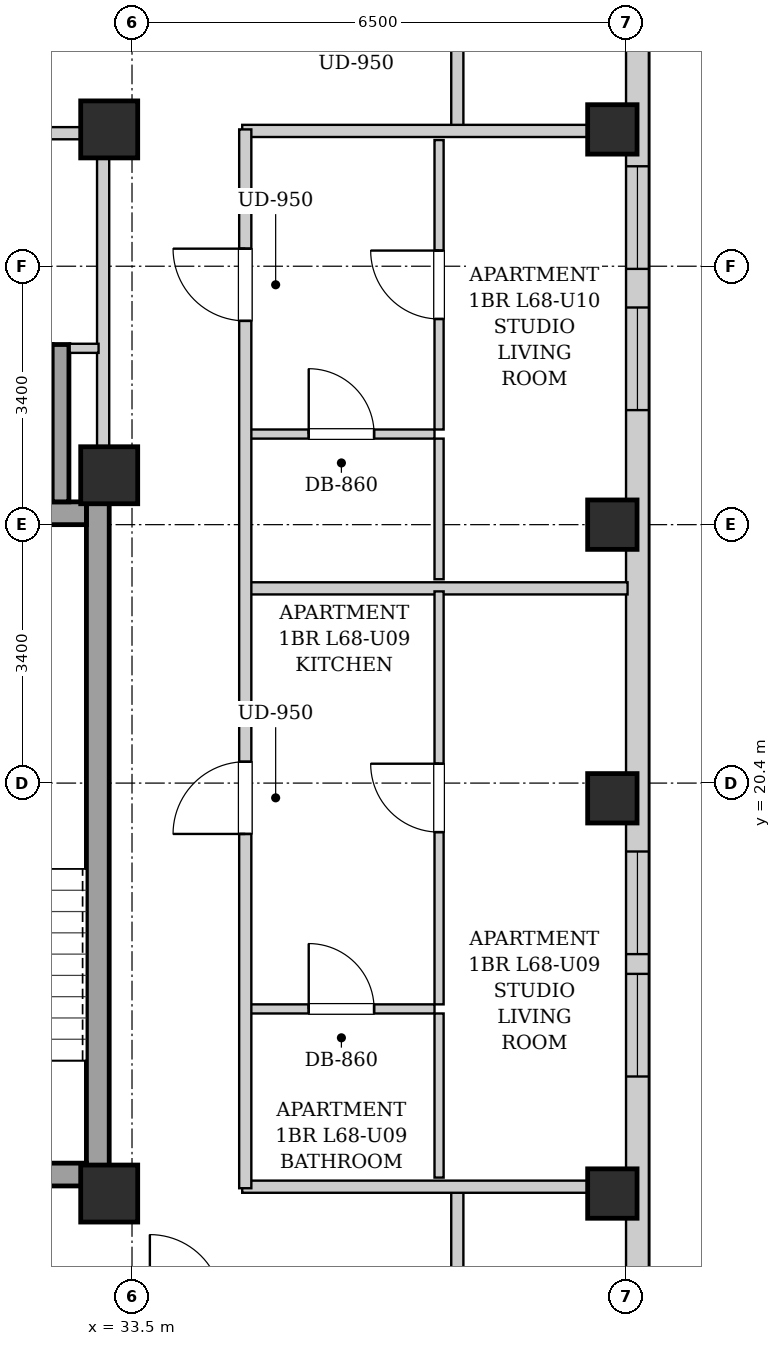
"""IFC4 building model, lengths in metres.
Left out: names, types, materials, properties, quantities, classifications, styles, units other than length and angle.
Written with IfcOpenShell. Run it as: python <this file> out.ifc"""

import sys

from ifc_helpers import new_model, si_unit, direction, frame, frame_2d, origin, origin_2d, place, context, subcontext, project, spatial, rectangle, extrude, element, fill, save


model = new_model("IFC4")
c1 = context("Model", 3, precision=1e-05, world=origin(), true_north=direction((0.0, 1.0)))
c2 = subcontext(c1, "Body", "Model", "MODEL_VIEW")
j1 = project(units=[si_unit("LENGTHUNIT", "METRE"), si_unit("PLANEANGLEUNIT", "RADIAN")], contexts=[c1])
p1 = place(None, origin())
s1 = spatial("IfcSite", under=j1, at=p1, CompositionType="ELEMENT")
p2 = place(p1, origin())
s2 = spatial("IfcBuilding", under=s1, at=p2, CompositionType="ELEMENT")
p3 = place(p2, frame((0.0, 0.0, 234.3)))
s3 = spatial("IfcBuildingStorey", under=s2, at=p3, CompositionType="ELEMENT", Elevation=234.3)
for number, where, z_axis, x_axis in (
    (1, (39.82, 15.0, 0.0), (0.0, 0.0, 1.0), (1.0, 0.0, 0.0)),
    (2, (39.82, 20.2, 0.0), (0.0, 0.0, 1.0), (1.0, 0.0, 0.0)),
    (3, (39.82, 23.8, 0.0), (0.0, 0.0, 1.0), (1.0, 0.0, 0.0)),
    (4, (39.82, 29.0, 0.0), (0.0, 0.0, 1.0), (1.0, 0.0, 0.0)),
):
    element("IfcColumn", number, at=place(p3, frame(where, z_axis=z_axis, x_axis=x_axis)), inside=s3, PredefinedType="COLUMN", context=c2, shape_type="SweptSolid", body=[
        extrude(rectangle(XDim=0.65, YDim=0.65, at=origin_2d()), origin(), (0.0, 0.0, 1.0), 3.4),
    ])
for number, where, z_axis, x_axis in (
    (5, (33.2, 15.0, 0.0), (0.0, 0.0, 1.0), (1.0, 0.0, 0.0)),
    (6, (33.2, 29.0, 0.0), (0.0, 0.0, 1.0), (1.0, 0.0, 0.0)),
    (7, (33.2, 24.45, 0.0), (0.0, 0.0, 1.0), (1.0, 0.0, 0.0)),
):
    element("IfcColumn", number, at=place(p3, frame(where, z_axis=z_axis, x_axis=x_axis)), inside=s3, PredefinedType="COLUMN", context=c2, shape_type="SweptSolid", body=[
        extrude(rectangle(XDim=0.75, YDim=0.75, at=origin_2d()), origin(), (0.0, 0.0, 1.0), 3.4),
    ])
p4 = place(p3, frame((40.15, 37.7, 0.0), z_axis=(0.0, 0.0, 1.0), x_axis=(0.0, -1.0, 0.0)))
e8 = element("IfcWall", 8, at=p4, inside=s3, PredefinedType="SOLIDWALL", context=c2, shape_type="SweptSolid", body=[
    extrude(rectangle(XDim=31.4, YDim=0.3, at=frame_2d((15.7, 0.0))), origin(), (0.0, 0.0, 1.0), 3.14),
])
p5 = place(p4, frame((28.546, 0.0, 0.55)))
e9 = element("IfcOpeningElement", 9, at=p5, cuts=e8, PredefinedType="OPENING", context=c2, shape_type="SweptSolid", body=[
    extrude(rectangle(XDim=1.35, YDim=1.2, at=frame_2d((0.675, 0.6))), frame((0.0, 0.16, 0.0), z_axis=(0.0, -1.0, 0.0), x_axis=(1.0, 0.0, 0.0)), (0.0, 0.0, 1.0), 0.32),
])
p6 = place(p4, frame((1.504, 0.0, 0.55)))
e10 = element("IfcOpeningElement", 10, at=p6, cuts=e8, PredefinedType="OPENING", context=c2, shape_type="SweptSolid", body=[
    extrude(rectangle(XDim=1.35, YDim=1.2, at=frame_2d((0.675, 0.6))), frame((0.0, 0.16, 0.0), z_axis=(0.0, -1.0, 0.0), x_axis=(1.0, 0.0, 0.0)), (0.0, 0.0, 1.0), 0.32),
])
p7 = place(p4, frame((18.2, 0.0, 0.55)))
e11 = element("IfcOpeningElement", 11, at=p7, cuts=e8, PredefinedType="OPENING", context=c2, shape_type="SweptSolid", body=[
    extrude(rectangle(XDim=1.35, YDim=1.2, at=frame_2d((0.675, 0.6))), frame((0.0, 0.16, 0.0), z_axis=(0.0, -1.0, 0.0), x_axis=(1.0, 0.0, 0.0)), (0.0, 0.0, 1.0), 0.32),
])
p8 = place(p4, frame((19.81, 0.0, 0.55)))
e12 = element("IfcOpeningElement", 12, at=p8, cuts=e8, PredefinedType="OPENING", context=c2, shape_type="SweptSolid", body=[
    extrude(rectangle(XDim=1.35, YDim=1.2, at=frame_2d((0.675, 0.6))), frame((0.0, 0.16, 0.0), z_axis=(0.0, -1.0, 0.0), x_axis=(1.0, 0.0, 0.0)), (0.0, 0.0, 1.0), 0.32),
])
p9 = place(p4, frame((11.043, 0.0, 0.55)))
e13 = element("IfcOpeningElement", 13, at=p9, cuts=e8, PredefinedType="OPENING", context=c2, shape_type="SweptSolid", body=[
    extrude(rectangle(XDim=1.35, YDim=1.2, at=frame_2d((0.675, 0.6))), frame((0.0, 0.16, 0.0), z_axis=(0.0, -1.0, 0.0), x_axis=(1.0, 0.0, 0.0)), (0.0, 0.0, 1.0), 0.32),
])
p10 = place(p4, frame((9.185, 0.0, 0.55)))
e14 = element("IfcOpeningElement", 14, at=p10, cuts=e8, PredefinedType="OPENING", context=c2, shape_type="SweptSolid", body=[
    extrude(rectangle(XDim=1.35, YDim=1.2, at=frame_2d((0.675, 0.6))), frame((0.0, 0.16, 0.0), z_axis=(0.0, -1.0, 0.0), x_axis=(1.0, 0.0, 0.0)), (0.0, 0.0, 1.0), 0.32),
])
p11 = place(p3, frame((33.05, 15.1, 0.0), z_axis=(0.0, 0.0, 1.0), x_axis=(0.0, 1.0, 0.0)))
e15 = element("IfcWall", 15, at=p11, inside=s3, PredefinedType="SHEAR", context=c2, shape_type="SweptSolid", body=[
    extrude(rectangle(XDim=9.0, YDim=0.3, at=frame_2d((4.5, 0.0))), origin(), (0.0, 0.0, 1.0), 3.14),
])
p12 = place(p3, frame((30.05, 23.95, 0.0), z_axis=(0.0, 0.0, 1.0), x_axis=(1.0, 0.0, 0.0)))
e16 = element("IfcWall", 16, at=p12, inside=s3, PredefinedType="SHEAR", context=c2, shape_type="SweptSolid", body=[
    extrude(rectangle(XDim=2.85, YDim=0.3, at=frame_2d((1.425, 0.0))), origin(), (0.0, 0.0, 1.0), 3.14),
])
p13 = place(p3, frame((30.05, 15.25, 0.0), z_axis=(0.0, 0.0, 1.0), x_axis=(1.0, 0.0, 0.0)))
e17 = element("IfcWall", 17, at=p13, inside=s3, PredefinedType="SHEAR", context=c2, shape_type="SweptSolid", body=[
    extrude(rectangle(XDim=2.85, YDim=0.3, at=frame_2d((1.425, 0.0))), origin(), (0.0, 0.0, 1.0), 3.14),
])
p14 = place(p13, frame((0.86, 0.0, 0.0)))
e18 = element("IfcOpeningElement", 18, at=p14, cuts=e17, PredefinedType="OPENING", context=c2, shape_type="SweptSolid", body=[
    extrude(rectangle(XDim=1.1, YDim=2.05, at=frame_2d((0.55, 1.025))), frame((0.0, 0.16, 0.0), z_axis=(0.0, -1.0, 0.0), x_axis=(1.0, 0.0, 0.0)), (0.0, 0.0, 1.0), 0.32),
])
p15 = place(p3, frame((32.56, 24.1, 0.0), z_axis=(0.0, 0.0, 1.0), x_axis=(0.0, 1.0, 0.0)))
e19 = element("IfcWall", 19, at=p15, inside=s3, PredefinedType="SHEAR", context=c2, shape_type="SweptSolid", body=[
    extrude(rectangle(XDim=2.07, YDim=0.22, at=frame_2d((1.035, 0.0))), origin(), (0.0, 0.0, 1.0), 3.14),
])
p16 = place(p3, frame((33.12, 24.12, 0.0), z_axis=(0.0, 0.0, 1.0), x_axis=(0.0, 1.0, 0.0)))
e20 = element("IfcWall", 20, at=p16, inside=s3, PredefinedType="PARTITIONING", context=c2, shape_type="SweptSolid", body=[
    extrude(rectangle(XDim=4.76, YDim=0.16, at=frame_2d((2.38, 0.0))), origin(), (0.0, 0.0, 1.0), 3.14),
])
p17 = place(p3, frame((32.68, 26.12, 0.0), z_axis=(0.0, 0.0, 1.0), x_axis=(1.0, 0.0, 0.0)))
e21 = element("IfcWall", 21, at=p17, inside=s3, PredefinedType="PARTITIONING", context=c2, shape_type="SweptSolid", body=[
    extrude(rectangle(XDim=0.38, YDim=0.12, at=frame_2d((0.19, 0.0))), origin(), (0.0, 0.0, 1.0), 3.14),
])
p18 = place(p3, frame((30.08, 28.95, 0.0), z_axis=(0.0, 0.0, 1.0), x_axis=(1.0, 0.0, 0.0)))
e22 = element("IfcWall", 22, at=p18, inside=s3, PredefinedType="PARTITIONING", context=c2, shape_type="SweptSolid", body=[
    extrude(rectangle(XDim=2.96, YDim=0.16, at=frame_2d((1.48, 0.0))), origin(), (0.0, 0.0, 1.0), 3.14),
])
p19 = place(p18, frame((0.695, 0.0, 0.0)))
e23 = element("IfcOpeningElement", 23, at=p19, cuts=e22, PredefinedType="OPENING", context=c2, shape_type="SweptSolid", body=[
    extrude(rectangle(XDim=0.86, YDim=2.05, at=frame_2d((0.43, 1.025))), frame((0.0, 0.09, 0.0), z_axis=(0.0, -1.0, 0.0), x_axis=(1.0, 0.0, 0.0)), (0.0, 0.0, 1.0), 0.18),
])
for number, where, z_axis, x_axis in (
    (24, (37.78, 13.51, 0.0), (0.0, 0.0, 1.0), (0.0, 1.0, 0.0)),
    (25, (37.78, 28.98, 0.0), (0.0, 0.0, 1.0), (0.0, 1.0, 0.0)),
):
    element("IfcWall", number, at=place(p3, frame(where, z_axis=z_axis, x_axis=x_axis)), inside=s3, PredefinedType="PARTITIONING", context=c2, shape_type="SweptSolid", body=[
        extrude(rectangle(XDim=1.58, YDim=0.16, at=frame_2d((0.79, 0.0))), origin(), (0.0, 0.0, 1.0), 3.14),
    ])
for number, where, z_axis, x_axis in (
    (26, (34.95, 15.09, 0.0), (0.0, 0.0, 1.0), (1.0, 0.0, 0.0)),
    (27, (34.95, 28.98, 0.0), (0.0, 0.0, 1.0), (1.0, 0.0, 0.0)),
):
    element("IfcWall", number, at=place(p3, frame(where, z_axis=z_axis, x_axis=x_axis)), inside=s3, PredefinedType="PARTITIONING", context=c2, shape_type="SweptSolid", body=[
        extrude(rectangle(XDim=5.07, YDim=0.16, at=frame_2d((2.535, 0.0))), origin(), (0.0, 0.0, 1.0), 2.668),
    ])
p20 = place(p3, frame((35.03, 22.962, 0.0), z_axis=(0.0, 0.0, 1.0), x_axis=(1.0, 0.0, 0.0)))
e28 = element("IfcWall", 28, at=p20, inside=s3, PredefinedType="PARTITIONING", context=c2, shape_type="SweptSolid", body=[
    extrude(rectangle(XDim=4.99, YDim=0.16, at=frame_2d((2.495, 0.0))), origin(), (0.0, 0.0, 1.0), 3.14),
])
p21 = place(p3, frame((35.03, 17.429, 0.0), z_axis=(0.0, 0.0, 1.0), x_axis=(1.0, 0.0, 0.0)))
e29 = element("IfcWall", 29, at=p21, inside=s3, PredefinedType="PARTITIONING", context=c2, shape_type="SweptSolid", body=[
    extrude(rectangle(XDim=2.45, YDim=0.12, at=frame_2d((1.225, 0.0))), origin(), (0.0, 0.0, 1.0), 3.14),
])
p22 = place(p21, frame((0.795, 0.0, 0.0)))
e30 = element("IfcOpeningElement", 30, at=p22, cuts=e29, PredefinedType="OPENING", context=c2, shape_type="SweptSolid", body=[
    extrude(rectangle(XDim=0.86, YDim=2.05, at=frame_2d((0.43, 1.025))), frame((0.0, 0.07, 0.0), z_axis=(0.0, -1.0, 0.0), x_axis=(1.0, 0.0, 0.0)), (0.0, 0.0, 1.0), 0.14),
])
p23 = place(p3, frame((37.54, 15.21, 0.0), z_axis=(0.0, 0.0, 1.0), x_axis=(0.0, 1.0, 0.0)))
e31 = element("IfcWall", 31, at=p23, inside=s3, PredefinedType="PARTITIONING", context=c2, shape_type="SweptSolid", body=[
    extrude(rectangle(XDim=2.159, YDim=0.12, at=frame_2d((1.08, 0.0))), origin(), (0.0, 0.0, 1.0), 3.14),
])
p24 = place(p3, frame((37.54, 17.489, 0.0), z_axis=(0.0, 0.0, 1.0), x_axis=(0.0, 1.0, 0.0)))
e32 = element("IfcWall", 32, at=p24, inside=s3, PredefinedType="PARTITIONING", context=c2, shape_type="SweptSolid", body=[
    extrude(rectangle(XDim=5.433, YDim=0.12, at=frame_2d((2.717, 0.0))), origin(), (0.0, 0.0, 1.0), 3.14),
])
p25 = place(p24, frame((2.266, 0.0, 0.0)))
e33 = element("IfcOpeningElement", 33, at=p25, cuts=e32, PredefinedType="OPENING", context=c2, shape_type="SweptSolid", body=[
    extrude(rectangle(XDim=0.9, YDim=2.05, at=frame_2d((0.45, 1.025))), frame((0.0, 0.07, 0.0), z_axis=(0.0, -1.0, 0.0), x_axis=(1.0, 0.0, 0.0)), (0.0, 0.0, 1.0), 0.14),
])
p26 = place(p3, frame((35.03, 24.992, 0.0), z_axis=(0.0, 0.0, 1.0), x_axis=(1.0, 0.0, 0.0)))
e34 = element("IfcWall", 34, at=p26, inside=s3, PredefinedType="PARTITIONING", context=c2, shape_type="SweptSolid", body=[
    extrude(rectangle(XDim=2.45, YDim=0.12, at=frame_2d((1.225, 0.0))), origin(), (0.0, 0.0, 1.0), 3.14),
])
p27 = place(p26, frame((0.795, 0.0, 0.0)))
e35 = element("IfcOpeningElement", 35, at=p27, cuts=e34, PredefinedType="OPENING", context=c2, shape_type="SweptSolid", body=[
    extrude(rectangle(XDim=0.86, YDim=2.05, at=frame_2d((0.43, 1.025))), frame((0.0, 0.07, 0.0), z_axis=(0.0, -1.0, 0.0), x_axis=(1.0, 0.0, 0.0)), (0.0, 0.0, 1.0), 0.14),
])
p28 = place(p3, frame((37.54, 23.082, 0.0), z_axis=(0.0, 0.0, 1.0), x_axis=(0.0, 1.0, 0.0)))
e36 = element("IfcWall", 36, at=p28, inside=s3, PredefinedType="PARTITIONING", context=c2, shape_type="SweptSolid", body=[
    extrude(rectangle(XDim=1.85, YDim=0.12, at=frame_2d((0.925, 0.0))), origin(), (0.0, 0.0, 1.0), 3.14),
])
p29 = place(p3, frame((37.54, 25.052, 0.0), z_axis=(0.0, 0.0, 1.0), x_axis=(0.0, 1.0, 0.0)))
e37 = element("IfcWall", 37, at=p29, inside=s3, PredefinedType="PARTITIONING", context=c2, shape_type="SweptSolid", body=[
    extrude(rectangle(XDim=3.808, YDim=0.12, at=frame_2d((1.904, 0.0))), origin(), (0.0, 0.0, 1.0), 3.14),
])
p30 = place(p29, frame((1.454, 0.0, 0.0)))
e38 = element("IfcOpeningElement", 38, at=p30, cuts=e37, PredefinedType="OPENING", context=c2, shape_type="SweptSolid", body=[
    extrude(rectangle(XDim=0.9, YDim=2.05, at=frame_2d((0.45, 1.025))), frame((0.0, 0.07, 0.0), z_axis=(0.0, -1.0, 0.0), x_axis=(1.0, 0.0, 0.0)), (0.0, 0.0, 1.0), 0.14),
])
p31 = place(p3, frame((34.99, 15.07, 0.0), z_axis=(0.0, 0.0, 1.0), x_axis=(0.0, 1.0, 0.0)))
e39 = element("IfcWall", 39, at=p31, inside=s3, PredefinedType="PARTITIONING", context=c2, shape_type="SweptSolid", body=[
    extrude(rectangle(XDim=13.93, YDim=0.16, at=frame_2d((6.965, 0.0))), origin(), (0.0, 0.0, 1.0), 3.14),
])
p32 = place(p31, frame((4.661, 0.0, 0.0)))
e40 = element("IfcOpeningElement", 40, at=p32, cuts=e39, PredefinedType="OPENING", context=c2, shape_type="SweptSolid", body=[
    extrude(rectangle(XDim=0.95, YDim=2.1, at=frame_2d((0.475, 1.05))), frame((0.0, 0.09, 0.0), z_axis=(0.0, -1.0, 0.0), x_axis=(1.0, 0.0, 0.0)), (0.0, 0.0, 1.0), 0.18),
])
p33 = place(p31, frame((11.411, 0.0, 0.0)))
e41 = element("IfcOpeningElement", 41, at=p33, cuts=e39, PredefinedType="OPENING", context=c2, shape_type="SweptSolid", body=[
    extrude(rectangle(XDim=0.95, YDim=2.1, at=frame_2d((0.475, 1.05))), frame((0.0, 0.09, 0.0), z_axis=(0.0, -1.0, 0.0), x_axis=(1.0, 0.0, 0.0)), (0.0, 0.0, 1.0), 0.18),
])
p34 = place(p22, origin())
e42 = element("IfcDoor", 42, at=p34, inside=s3, OperationType="SINGLE_SWING_LEFT", PredefinedType="DOOR", context=c2, shape_type="SweptSolid", body=[
    extrude(rectangle(XDim=0.86, YDim=2.05, at=frame_2d((0.43, 1.025))), frame((0.0, 0.025, 0.0), z_axis=(0.0, -1.0, 0.0), x_axis=(1.0, 0.0, 0.0)), (0.0, 0.0, 1.0), 0.05),
])
fill(e30, e42)
p35 = place(p25, origin())
e43 = element("IfcDoor", 43, at=p35, inside=s3, OperationType="SINGLE_SWING_RIGHT", PredefinedType="DOOR", context=c2, shape_type="SweptSolid", body=[
    extrude(rectangle(XDim=0.9, YDim=2.05, at=frame_2d((0.45, 1.025))), frame((0.0, 0.025, 0.0), z_axis=(0.0, -1.0, 0.0), x_axis=(1.0, 0.0, 0.0)), (0.0, 0.0, 1.0), 0.05),
])
fill(e33, e43)
p36 = place(p27, origin())
e44 = element("IfcDoor", 44, at=p36, inside=s3, OperationType="SINGLE_SWING_LEFT", PredefinedType="DOOR", context=c2, shape_type="SweptSolid", body=[
    extrude(rectangle(XDim=0.86, YDim=2.05, at=frame_2d((0.43, 1.025))), frame((0.0, 0.025, 0.0), z_axis=(0.0, -1.0, 0.0), x_axis=(1.0, 0.0, 0.0)), (0.0, 0.0, 1.0), 0.05),
])
fill(e35, e44)
p37 = place(p30, origin())
e45 = element("IfcDoor", 45, at=p37, inside=s3, OperationType="SINGLE_SWING_RIGHT", PredefinedType="DOOR", context=c2, shape_type="SweptSolid", body=[
    extrude(rectangle(XDim=0.9, YDim=2.05, at=frame_2d((0.45, 1.025))), frame((0.0, 0.025, 0.0), z_axis=(0.0, -1.0, 0.0), x_axis=(1.0, 0.0, 0.0)), (0.0, 0.0, 1.0), 0.05),
])
fill(e38, e45)
p38 = place(p32, origin())
e46 = element("IfcDoor", 46, at=p38, inside=s3, OperationType="SINGLE_SWING_LEFT", PredefinedType="DOOR", context=c2, shape_type="SweptSolid", body=[
    extrude(rectangle(XDim=0.95, YDim=2.1, at=frame_2d((0.475, 1.05))), frame((0.0, 0.025, 0.0), z_axis=(0.0, -1.0, 0.0), x_axis=(1.0, 0.0, 0.0)), (0.0, 0.0, 1.0), 0.05),
])
fill(e40, e46)
p39 = place(p33, origin())
e47 = element("IfcDoor", 47, at=p39, inside=s3, OperationType="SINGLE_SWING_RIGHT", PredefinedType="DOOR", context=c2, shape_type="SweptSolid", body=[
    extrude(rectangle(XDim=0.95, YDim=2.1, at=frame_2d((0.475, 1.05))), frame((0.0, 0.025, 0.0), z_axis=(0.0, -1.0, 0.0), x_axis=(1.0, 0.0, 0.0)), (0.0, 0.0, 1.0), 0.05),
])
fill(e41, e47)
p40 = place(p7, origin())
e48 = element("IfcWindow", 48, at=p40, inside=s3, PartitioningType="SINGLE_PANEL", PredefinedType="WINDOW", context=c2, shape_type="SweptSolid", body=[
    extrude(rectangle(XDim=1.35, YDim=1.2, at=frame_2d((0.675, 0.6))), frame((0.0, 0.03, 0.0), z_axis=(0.0, -1.0, 0.0), x_axis=(1.0, 0.0, 0.0)), (0.0, 0.0, 1.0), 0.06),
])
fill(e11, e48)
p41 = place(p8, origin())
e49 = element("IfcWindow", 49, at=p41, inside=s3, PartitioningType="SINGLE_PANEL", PredefinedType="WINDOW", context=c2, shape_type="SweptSolid", body=[
    extrude(rectangle(XDim=1.35, YDim=1.2, at=frame_2d((0.675, 0.6))), frame((0.0, 0.03, 0.0), z_axis=(0.0, -1.0, 0.0), x_axis=(1.0, 0.0, 0.0)), (0.0, 0.0, 1.0), 0.06),
])
fill(e12, e49)
p42 = place(p9, origin())
e50 = element("IfcWindow", 50, at=p42, inside=s3, PartitioningType="SINGLE_PANEL", PredefinedType="WINDOW", context=c2, shape_type="SweptSolid", body=[
    extrude(rectangle(XDim=1.35, YDim=1.2, at=frame_2d((0.675, 0.6))), frame((0.0, 0.03, 0.0), z_axis=(0.0, -1.0, 0.0), x_axis=(1.0, 0.0, 0.0)), (0.0, 0.0, 1.0), 0.06),
])
fill(e13, e50)
p43 = place(p10, origin())
e51 = element("IfcWindow", 51, at=p43, inside=s3, PartitioningType="SINGLE_PANEL", PredefinedType="WINDOW", context=c2, shape_type="SweptSolid", body=[
    extrude(rectangle(XDim=1.35, YDim=1.2, at=frame_2d((0.675, 0.6))), frame((0.0, 0.03, 0.0), z_axis=(0.0, -1.0, 0.0), x_axis=(1.0, 0.0, 0.0)), (0.0, 0.0, 1.0), 0.06),
])
fill(e14, e51)
save(model, sys.argv[1])
